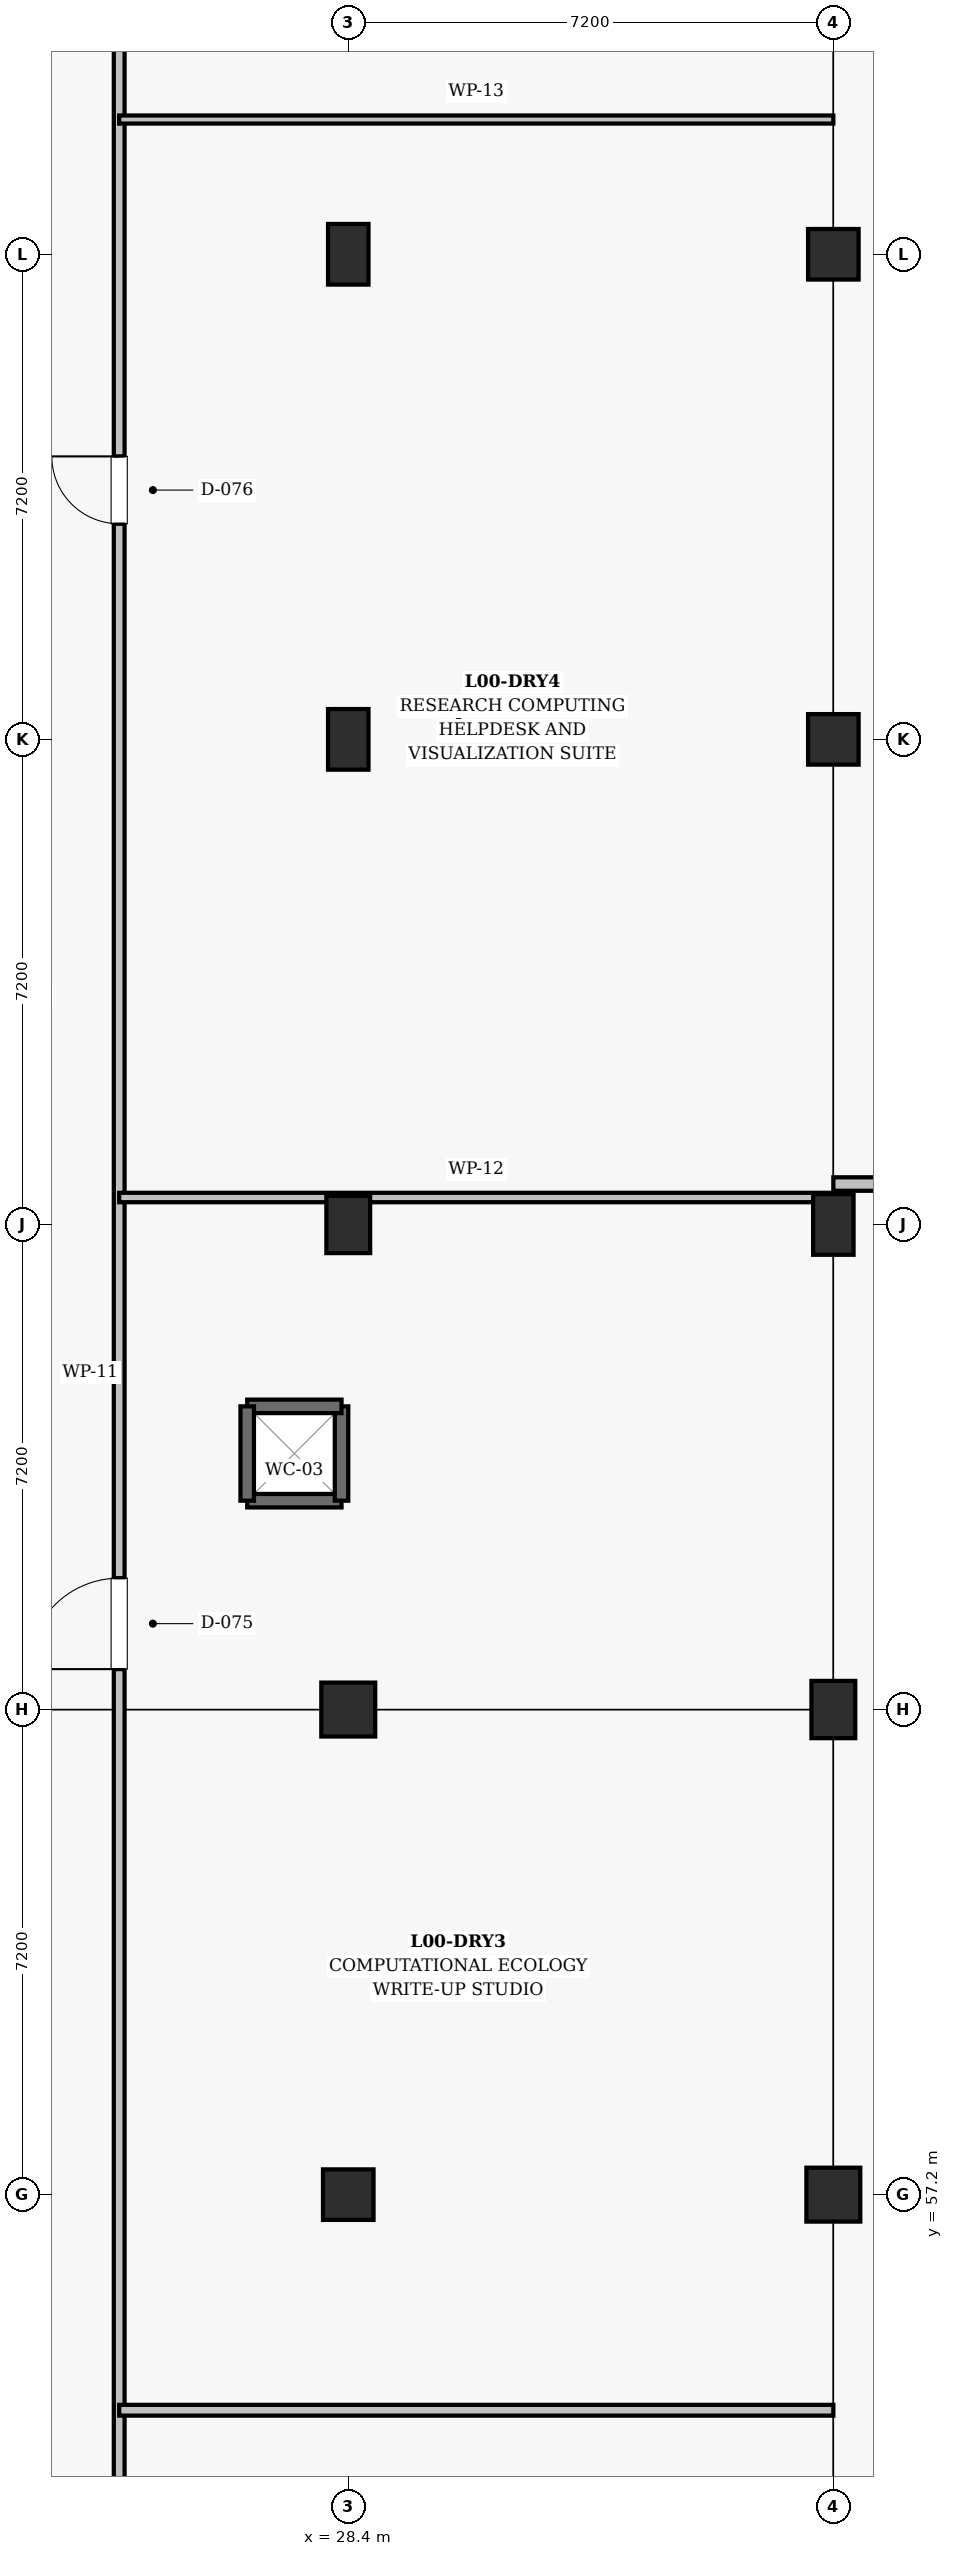
"""IFC4 building model, lengths in metres.
Left out: names, types, materials, properties, quantities, classifications, styles, units other than length and angle.
Written with IfcOpenShell. Run it as: python <this file> out.ifc"""

import sys

from ifc_helpers import new_model, si_unit, direction, frame, frame_2d, origin, origin_2d, place, context, subcontext, project, spatial, rectangle, extrude, element, fill, save


model = new_model("IFC4")
c1 = context("Model", 3, precision=1e-05, world=origin(), true_north=direction((0.0, 1.0)))
c2 = subcontext(c1, "Body", "Model", "MODEL_VIEW")
j1 = project(units=[si_unit("LENGTHUNIT", "METRE"), si_unit("PLANEANGLEUNIT", "RADIAN")], contexts=[c1])
p1 = place(None, origin())
s1 = spatial("IfcSite", under=j1, at=p1, CompositionType="ELEMENT")
p2 = place(p1, origin())
s2 = spatial("IfcBuilding", under=s1, at=p2, CompositionType="ELEMENT")
p3 = place(p2, origin())
s3 = spatial("IfcBuildingStorey", under=s2, at=p3, CompositionType="ELEMENT", Elevation=0.0)
p4 = place(p3, frame((28.4, 57.2, 0.0), z_axis=(0.0, 0.0, 1.0), x_axis=(1.0, 0.0, 0.0)))
e1 = element("IfcColumn", 1, at=p4, inside=s3, PredefinedType="COLUMN", context=c2, shape_type="SweptSolid", body=[
    extrude(rectangle(XDim=0.75, YDim=0.75, at=origin_2d()), origin(), (0.0, 0.0, 1.0), 5.4),
])
p5 = place(p3, frame((28.4, 64.4, 0.0), z_axis=(0.0, 0.0, 1.0), x_axis=(1.0, 0.0, 0.0)))
e2 = element("IfcColumn", 2, at=p5, inside=s3, PredefinedType="COLUMN", context=c2, shape_type="SweptSolid", body=[
    extrude(rectangle(XDim=0.8, YDim=0.8, at=origin_2d()), origin(), (0.0, 0.0, 1.0), 5.4),
])
p6 = place(p3, frame((28.4, 71.6, 0.0), z_axis=(0.0, 0.0, 1.0), x_axis=(1.0, 0.0, 0.0)))
e3 = element("IfcColumn", 3, at=p6, inside=s3, PredefinedType="COLUMN", context=c2, shape_type="SweptSolid", body=[
    extrude(rectangle(XDim=0.65, YDim=0.85, at=origin_2d()), origin(), (0.0, 0.0, 1.0), 5.4),
])
for number, where, z_axis, x_axis in (
    (4, (28.4, 78.8, 0.0), (0.0, 0.0, 1.0), (1.0, 0.0, 0.0)),
    (5, (28.4, 86.0, 0.0), (0.0, 0.0, 1.0), (1.0, 0.0, 0.0)),
):
    element("IfcColumn", number, at=place(p3, frame(where, z_axis=z_axis, x_axis=x_axis)), inside=s3, PredefinedType="COLUMN", context=c2, shape_type="SweptSolid", body=[
        extrude(rectangle(XDim=0.6, YDim=0.9, at=origin_2d()), origin(), (0.0, 0.0, 1.0), 5.4),
    ])
p7 = place(p3, frame((35.6, 57.2, 0.0), z_axis=(0.0, 0.0, 1.0), x_axis=(1.0, 0.0, 0.0)))
e6 = element("IfcColumn", 6, at=p7, inside=s3, PredefinedType="COLUMN", context=c2, shape_type="SweptSolid", body=[
    extrude(rectangle(XDim=0.8, YDim=0.8, at=origin_2d()), origin(), (0.0, 0.0, 1.0), 5.4),
])
p8 = place(p3, frame((35.6, 64.4, 0.0), z_axis=(0.0, 0.0, 1.0), x_axis=(1.0, 0.0, 0.0)))
e7 = element("IfcColumn", 7, at=p8, inside=s3, PredefinedType="COLUMN", context=c2, shape_type="SweptSolid", body=[
    extrude(rectangle(XDim=0.65, YDim=0.85, at=origin_2d()), origin(), (0.0, 0.0, 1.0), 5.4),
])
p9 = place(p3, frame((35.6, 71.6, 0.0), z_axis=(0.0, 0.0, 1.0), x_axis=(1.0, 0.0, 0.0)))
e8 = element("IfcColumn", 8, at=p9, inside=s3, PredefinedType="COLUMN", context=c2, shape_type="SweptSolid", body=[
    extrude(rectangle(XDim=0.6, YDim=0.9, at=origin_2d()), origin(), (0.0, 0.0, 1.0), 5.4),
])
for number, where, z_axis, x_axis in (
    (9, (35.6, 78.8, 0.0), (0.0, 0.0, 1.0), (1.0, 0.0, 0.0)),
    (10, (35.6, 86.0, 0.0), (0.0, 0.0, 1.0), (1.0, 0.0, 0.0)),
):
    element("IfcColumn", number, at=place(p3, frame(where, z_axis=z_axis, x_axis=x_axis)), inside=s3, PredefinedType="COLUMN", context=c2, shape_type="SweptSolid", body=[
        extrude(rectangle(XDim=0.75, YDim=0.75, at=origin_2d()), origin(), (0.0, 0.0, 1.0), 5.4),
    ])
p10 = place(p3, frame((26.9, 67.5, 0.0), z_axis=(0.0, 0.0, 1.0), x_axis=(1.0, 0.0, 0.0)))
e11 = element("IfcWall", 11, at=p10, inside=s3, PredefinedType="SHEAR", context=c2, shape_type="SweptSolid", body=[
    extrude(rectangle(XDim=1.4, YDim=0.2, at=frame_2d((0.7, 0.0))), origin(), (0.0, 0.0, 1.0), 5.06),
])
p11 = place(p3, frame((28.3, 67.5, 0.0), z_axis=(0.0, 0.0, 1.0), x_axis=(0.0, 1.0, 0.0)))
e12 = element("IfcWall", 12, at=p11, inside=s3, PredefinedType="SHEAR", context=c2, shape_type="SweptSolid", body=[
    extrude(rectangle(XDim=1.4, YDim=0.2, at=frame_2d((0.7, 0.0))), origin(), (0.0, 0.0, 1.0), 5.06),
])
p12 = place(p3, frame((28.3, 68.9, 0.0), z_axis=(0.0, 0.0, 1.0), x_axis=(-1.0, 0.0, 0.0)))
e13 = element("IfcWall", 13, at=p12, inside=s3, PredefinedType="SHEAR", context=c2, shape_type="SweptSolid", body=[
    extrude(rectangle(XDim=1.4, YDim=0.2, at=frame_2d((0.7, 0.0))), origin(), (0.0, 0.0, 1.0), 5.06),
])
p13 = place(p3, frame((26.9, 68.9, 0.0), z_axis=(0.0, 0.0, 1.0), x_axis=(0.0, -1.0, 0.0)))
e14 = element("IfcWall", 14, at=p13, inside=s3, PredefinedType="SHEAR", context=c2, shape_type="SweptSolid", body=[
    extrude(rectangle(XDim=1.4, YDim=0.2, at=frame_2d((0.7, 0.0))), origin(), (0.0, 0.0, 1.0), 5.06),
])
p14 = place(p3, frame((25.0, 36.0, 0.0), z_axis=(0.0, 0.0, 1.0), x_axis=(0.0, 1.0, 0.0)))
e15 = element("IfcWall", 15, at=p14, inside=s3, PredefinedType="PARTITIONING", context=c2, shape_type="SweptSolid", body=[
    extrude(rectangle(XDim=66.8, YDim=0.16, at=frame_2d((33.4, 0.0))), origin(), (0.0, 0.0, 1.0), 4.28),
])
p15 = place(p14, frame((9.0, 0.0, 0.0)))
e16 = element("IfcOpeningElement", 16, at=p15, cuts=e15, PredefinedType="OPENING", context=c2, shape_type="SweptSolid", body=[
    extrude(rectangle(XDim=1.25, YDim=2.2, at=frame_2d((0.625, 1.1))), frame((0.0, 0.09, 0.0), z_axis=(0.0, -1.0, 0.0), x_axis=(1.0, 0.0, 0.0)), (0.0, 0.0, 1.0), 0.18),
])
p16 = place(p14, frame((29.0, 0.0, 0.0)))
e17 = element("IfcOpeningElement", 17, at=p16, cuts=e15, PredefinedType="OPENING", context=c2, shape_type="SweptSolid", body=[
    extrude(rectangle(XDim=1.35, YDim=2.2, at=frame_2d((0.675, 1.1))), frame((0.0, 0.09, 0.0), z_axis=(0.0, -1.0, 0.0), x_axis=(1.0, 0.0, 0.0)), (0.0, 0.0, 1.0), 0.18),
])
p17 = place(p14, frame((46.0, 0.0, 0.0)))
e18 = element("IfcOpeningElement", 18, at=p17, cuts=e15, PredefinedType="OPENING", context=c2, shape_type="SweptSolid", body=[
    extrude(rectangle(XDim=1.0, YDim=2.15, at=frame_2d((0.5, 1.075))), frame((0.0, 0.09, 0.0), z_axis=(0.0, -1.0, 0.0), x_axis=(1.0, 0.0, 0.0)), (0.0, 0.0, 1.0), 0.18),
])
p18 = place(p14, frame((59.2, 0.0, 0.0)))
e19 = element("IfcOpeningElement", 19, at=p18, cuts=e15, PredefinedType="OPENING", context=c2, shape_type="SweptSolid", body=[
    extrude(rectangle(XDim=1.1, YDim=2.15, at=frame_2d((0.55, 1.075))), frame((0.0, 0.09, 0.0), z_axis=(0.0, -1.0, 0.0), x_axis=(1.0, 0.0, 0.0)), (0.0, 0.0, 1.0), 0.18),
])
p19 = place(p3, frame((25.0, 54.0, 0.0), z_axis=(0.0, 0.0, 1.0), x_axis=(1.0, 0.0, 0.0)))
e20 = element("IfcWall", 20, at=p19, inside=s3, PredefinedType="PARTITIONING", context=c2, shape_type="SweptSolid", body=[
    extrude(rectangle(XDim=10.6, YDim=0.16, at=frame_2d((5.3, 0.0))), origin(), (0.0, 0.0, 1.0), 4.38),
])
p20 = place(p3, frame((25.0, 72.0, 0.0), z_axis=(0.0, 0.0, 1.0), x_axis=(1.0, 0.0, 0.0)))
e21 = element("IfcWall", 21, at=p20, inside=s3, PredefinedType="PARTITIONING", context=c2, shape_type="SweptSolid", body=[
    extrude(rectangle(XDim=10.6, YDim=0.14, at=frame_2d((5.3, 0.0))), origin(), (0.0, 0.0, 1.0), 4.48),
])
p21 = place(p3, frame((25.0, 88.0, 0.0), z_axis=(0.0, 0.0, 1.0), x_axis=(1.0, 0.0, 0.0)))
e22 = element("IfcWall", 22, at=p21, inside=s3, PredefinedType="PARTITIONING", context=c2, shape_type="SweptSolid", body=[
    extrude(rectangle(XDim=10.6, YDim=0.12, at=frame_2d((5.3, 0.0))), origin(), (0.0, 0.0, 1.0), 3.88),
])
p22 = place(p3, frame((35.6, 72.2, 0.0), z_axis=(0.0, 0.0, 1.0), x_axis=(1.0, 0.0, 0.0)))
e23 = element("IfcWall", 23, at=p22, inside=s3, PredefinedType="SOLIDWALL", context=c2, shape_type="SweptSolid", body=[
    extrude(rectangle(XDim=13.8, YDim=0.2, at=frame_2d((6.9, 0.0))), origin(), (0.0, 0.0, 1.0), 4.46),
])
p23 = place(p16, origin())
e24 = element("IfcDoor", 24, at=p23, inside=s3, OperationType="SINGLE_SWING_LEFT", PredefinedType="DOOR", context=c2, shape_type="SweptSolid", body=[
    extrude(rectangle(XDim=1.35, YDim=2.2, at=frame_2d((0.675, 1.1))), frame((0.0, 0.025, 0.0), z_axis=(0.0, -1.0, 0.0), x_axis=(1.0, 0.0, 0.0)), (0.0, 0.0, 1.0), 0.05),
])
fill(e17, e24)
p24 = place(p17, origin())
e25 = element("IfcDoor", 25, at=p24, inside=s3, OperationType="SINGLE_SWING_RIGHT", PredefinedType="DOOR", context=c2, shape_type="SweptSolid", body=[
    extrude(rectangle(XDim=1.0, YDim=2.15, at=frame_2d((0.5, 1.075))), frame((0.0, 0.025, 0.0), z_axis=(0.0, -1.0, 0.0), x_axis=(1.0, 0.0, 0.0)), (0.0, 0.0, 1.0), 0.05),
])
fill(e18, e25)
save(model, sys.argv[1])
